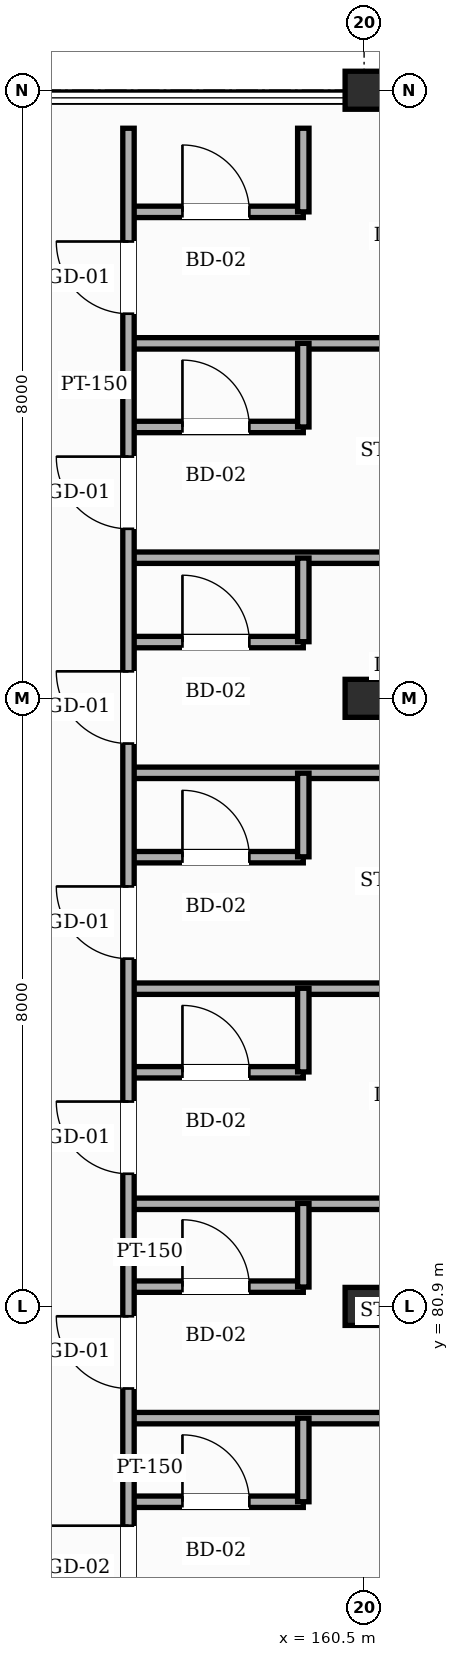
"""IFC4 building model, lengths in metres.
Left out: names, types, materials, properties, quantities, classifications, styles, units other than length and angle.
Written with IfcOpenShell. Run it as: python <this file> out.ifc"""

import sys

from ifc_helpers import new_model, si_unit, direction, frame, frame_2d, origin, origin_2d, place, context, subcontext, project, spatial, rectangle, hollow_rectangle, extrude, element, fill, save


model = new_model("IFC4")
c1 = context("Model", 3, precision=1e-05, world=origin(), true_north=direction((0.0, 1.0)))
c2 = subcontext(c1, "Body", "Model", "MODEL_VIEW")
j1 = project(units=[si_unit("LENGTHUNIT", "METRE"), si_unit("PLANEANGLEUNIT", "RADIAN")], contexts=[c1])
p1 = place(None, origin())
s1 = spatial("IfcSite", under=j1, at=p1, CompositionType="ELEMENT")
p2 = place(p1, origin())
s2 = spatial("IfcBuilding", under=s1, at=p2, CompositionType="ELEMENT")
p3 = place(p2, frame((0.0, 0.0, 35.4)))
s3 = spatial("IfcBuildingStorey", under=s2, at=p3, CompositionType="ELEMENT", Elevation=35.4)
for number, where, z_axis, x_axis in (
    (1, (160.5, 80.9, 0.0), (0.0, 0.0, 1.0), (1.0, 0.0, 0.0)),
    (2, (160.5, 88.9, 0.0), (0.0, 0.0, 1.0), (1.0, 0.0, 0.0)),
    (3, (160.5, 96.9, 0.0), (0.0, 0.0, 1.0), (1.0, 0.0, 0.0)),
):
    element("IfcColumn", number, at=place(p3, frame(where, z_axis=z_axis, x_axis=x_axis)), inside=s3, PredefinedType="COLUMN", context=c2, shape_type="SweptSolid", body=[
        extrude(hollow_rectangle(XDim=0.5, YDim=0.5, WallThickness=0.022, InnerFilletRadius=0.022, OuterFilletRadius=0.044, at=origin_2d()), origin(), (0.0, 0.0, 1.0), 3.6),
    ])
p4 = place(p3, frame((157.4, 78.33, 0.0), z_axis=(0.0, 0.0, 1.0), x_axis=(1.0, 0.0, 0.0)))
e4 = element("IfcWall", 4, at=p4, inside=s3, PredefinedType="PARTITIONING", context=c2, shape_type="SweptSolid", body=[
    extrude(rectangle(XDim=2.3, YDim=0.15, at=frame_2d((1.15, 0.0))), origin(), (0.0, 0.0, 1.0), 3.365),
])
p5 = place(p4, frame((0.71, 0.0, 0.0)))
e5 = element("IfcOpeningElement", 5, at=p5, cuts=e4, PredefinedType="OPENING", context=c2, shape_type="SweptSolid", body=[
    extrude(rectangle(XDim=0.88, YDim=2.12, at=frame_2d((0.44, 1.06))), frame((0.0, 0.085, 0.0), z_axis=(0.0, -1.0, 0.0), x_axis=(1.0, 0.0, 0.0)), (0.0, 0.0, 1.0), 0.17),
])
p6 = place(p3, frame((157.4, 79.43, 0.0), z_axis=(0.0, 0.0, 1.0), x_axis=(1.0, 0.0, 0.0)))
e6 = element("IfcWall", 6, at=p6, inside=s3, PredefinedType="PARTITIONING", context=c2, shape_type="SweptSolid", body=[
    extrude(rectangle(XDim=9.8, YDim=0.15, at=frame_2d((4.9, 0.0))), origin(), (0.0, 0.0, 1.0), 3.365),
])
p7 = place(p3, frame((157.4, 81.16, 0.0), z_axis=(0.0, 0.0, 1.0), x_axis=(1.0, 0.0, 0.0)))
e7 = element("IfcWall", 7, at=p7, inside=s3, PredefinedType="PARTITIONING", context=c2, shape_type="SweptSolid", body=[
    extrude(rectangle(XDim=2.3, YDim=0.15, at=frame_2d((1.15, 0.0))), origin(), (0.0, 0.0, 1.0), 2.755),
])
p8 = place(p7, frame((0.71, 0.0, 0.0)))
e8 = element("IfcOpeningElement", 8, at=p8, cuts=e7, PredefinedType="OPENING", context=c2, shape_type="SweptSolid", body=[
    extrude(rectangle(XDim=0.88, YDim=2.12, at=frame_2d((0.44, 1.06))), frame((0.0, 0.085, 0.0), z_axis=(0.0, -1.0, 0.0), x_axis=(1.0, 0.0, 0.0)), (0.0, 0.0, 1.0), 0.17),
])
p9 = place(p3, frame((157.4, 82.25, 0.0), z_axis=(0.0, 0.0, 1.0), x_axis=(1.0, 0.0, 0.0)))
e9 = element("IfcWall", 9, at=p9, inside=s3, PredefinedType="PARTITIONING", context=c2, shape_type="SweptSolid", body=[
    extrude(rectangle(XDim=9.8, YDim=0.15, at=frame_2d((4.9, 0.0))), origin(), (0.0, 0.0, 1.0), 3.365),
])
p10 = place(p3, frame((157.4, 83.98, 0.0), z_axis=(0.0, 0.0, 1.0), x_axis=(1.0, 0.0, 0.0)))
e10 = element("IfcWall", 10, at=p10, inside=s3, PredefinedType="PARTITIONING", context=c2, shape_type="SweptSolid", body=[
    extrude(rectangle(XDim=2.3, YDim=0.15, at=frame_2d((1.15, 0.0))), origin(), (0.0, 0.0, 1.0), 3.365),
])
p11 = place(p10, frame((0.71, 0.0, 0.0)))
e11 = element("IfcOpeningElement", 11, at=p11, cuts=e10, PredefinedType="OPENING", context=c2, shape_type="SweptSolid", body=[
    extrude(rectangle(XDim=0.88, YDim=2.12, at=frame_2d((0.44, 1.06))), frame((0.0, 0.085, 0.0), z_axis=(0.0, -1.0, 0.0), x_axis=(1.0, 0.0, 0.0)), (0.0, 0.0, 1.0), 0.17),
])
p12 = place(p3, frame((157.4, 85.08, 0.0), z_axis=(0.0, 0.0, 1.0), x_axis=(1.0, 0.0, 0.0)))
e12 = element("IfcWall", 12, at=p12, inside=s3, PredefinedType="PARTITIONING", context=c2, shape_type="SweptSolid", body=[
    extrude(rectangle(XDim=9.8, YDim=0.15, at=frame_2d((4.9, 0.0))), origin(), (0.0, 0.0, 1.0), 3.005),
])
p13 = place(p3, frame((157.4, 86.81, 0.0), z_axis=(0.0, 0.0, 1.0), x_axis=(1.0, 0.0, 0.0)))
e13 = element("IfcWall", 13, at=p13, inside=s3, PredefinedType="PARTITIONING", context=c2, shape_type="SweptSolid", body=[
    extrude(rectangle(XDim=2.3, YDim=0.15, at=frame_2d((1.15, 0.0))), origin(), (0.0, 0.0, 1.0), 3.365),
])
p14 = place(p13, frame((0.71, 0.0, 0.0)))
e14 = element("IfcOpeningElement", 14, at=p14, cuts=e13, PredefinedType="OPENING", context=c2, shape_type="SweptSolid", body=[
    extrude(rectangle(XDim=0.88, YDim=2.12, at=frame_2d((0.44, 1.06))), frame((0.0, 0.085, 0.0), z_axis=(0.0, -1.0, 0.0), x_axis=(1.0, 0.0, 0.0)), (0.0, 0.0, 1.0), 0.17),
])
p15 = place(p3, frame((157.4, 87.92, 0.0), z_axis=(0.0, 0.0, 1.0), x_axis=(1.0, 0.0, 0.0)))
e15 = element("IfcWall", 15, at=p15, inside=s3, PredefinedType="PARTITIONING", context=c2, shape_type="SweptSolid", body=[
    extrude(rectangle(XDim=9.8, YDim=0.15, at=frame_2d((4.9, 0.0))), origin(), (0.0, 0.0, 1.0), 3.365),
])
p16 = place(p3, frame((157.4, 89.64, 0.0), z_axis=(0.0, 0.0, 1.0), x_axis=(1.0, 0.0, 0.0)))
e16 = element("IfcWall", 16, at=p16, inside=s3, PredefinedType="PARTITIONING", context=c2, shape_type="SweptSolid", body=[
    extrude(rectangle(XDim=2.3, YDim=0.15, at=frame_2d((1.15, 0.0))), origin(), (0.0, 0.0, 1.0), 3.365),
])
p17 = place(p16, frame((0.71, 0.0, 0.0)))
e17 = element("IfcOpeningElement", 17, at=p17, cuts=e16, PredefinedType="OPENING", context=c2, shape_type="SweptSolid", body=[
    extrude(rectangle(XDim=0.88, YDim=2.12, at=frame_2d((0.44, 1.06))), frame((0.0, 0.085, 0.0), z_axis=(0.0, -1.0, 0.0), x_axis=(1.0, 0.0, 0.0)), (0.0, 0.0, 1.0), 0.17),
])
p18 = place(p3, frame((157.4, 90.75, 0.0), z_axis=(0.0, 0.0, 1.0), x_axis=(1.0, 0.0, 0.0)))
e18 = element("IfcWall", 18, at=p18, inside=s3, PredefinedType="PARTITIONING", context=c2, shape_type="SweptSolid", body=[
    extrude(rectangle(XDim=9.8, YDim=0.15, at=frame_2d((4.9, 0.0))), origin(), (0.0, 0.0, 1.0), 3.365),
])
p19 = place(p3, frame((157.4, 92.47, 0.0), z_axis=(0.0, 0.0, 1.0), x_axis=(1.0, 0.0, 0.0)))
e19 = element("IfcWall", 19, at=p19, inside=s3, PredefinedType="PARTITIONING", context=c2, shape_type="SweptSolid", body=[
    extrude(rectangle(XDim=2.3, YDim=0.15, at=frame_2d((1.15, 0.0))), origin(), (0.0, 0.0, 1.0), 3.365),
])
p20 = place(p19, frame((0.71, 0.0, 0.0)))
e20 = element("IfcOpeningElement", 20, at=p20, cuts=e19, PredefinedType="OPENING", context=c2, shape_type="SweptSolid", body=[
    extrude(rectangle(XDim=0.88, YDim=2.12, at=frame_2d((0.44, 1.06))), frame((0.0, 0.085, 0.0), z_axis=(0.0, -1.0, 0.0), x_axis=(1.0, 0.0, 0.0)), (0.0, 0.0, 1.0), 0.17),
])
p21 = place(p3, frame((157.4, 93.57, 0.0), z_axis=(0.0, 0.0, 1.0), x_axis=(1.0, 0.0, 0.0)))
e21 = element("IfcWall", 21, at=p21, inside=s3, PredefinedType="PARTITIONING", context=c2, shape_type="SweptSolid", body=[
    extrude(rectangle(XDim=9.8, YDim=0.15, at=frame_2d((4.9, 0.0))), origin(), (0.0, 0.0, 1.0), 3.365),
])
p22 = place(p3, frame((157.4, 95.3, 0.0), z_axis=(0.0, 0.0, 1.0), x_axis=(1.0, 0.0, 0.0)))
e22 = element("IfcWall", 22, at=p22, inside=s3, PredefinedType="PARTITIONING", context=c2, shape_type="SweptSolid", body=[
    extrude(rectangle(XDim=2.3, YDim=0.15, at=frame_2d((1.15, 0.0))), origin(), (0.0, 0.0, 1.0), 3.365),
])
p23 = place(p22, frame((0.71, 0.0, 0.0)))
e23 = element("IfcOpeningElement", 23, at=p23, cuts=e22, PredefinedType="OPENING", context=c2, shape_type="SweptSolid", body=[
    extrude(rectangle(XDim=0.88, YDim=2.12, at=frame_2d((0.44, 1.06))), frame((0.0, 0.085, 0.0), z_axis=(0.0, -1.0, 0.0), x_axis=(1.0, 0.0, 0.0)), (0.0, 0.0, 1.0), 0.17),
])
p24 = place(p3, frame((157.4, 76.6, 0.0), z_axis=(0.0, 0.0, 1.0), x_axis=(0.0, 1.0, 0.0)))
e24 = element("IfcWall", 24, at=p24, inside=s3, PredefinedType="PARTITIONING", context=c2, shape_type="SweptSolid", body=[
    extrude(rectangle(XDim=19.8, YDim=0.15, at=frame_2d((9.9, 0.0))), origin(), (0.0, 0.0, 1.0), 3.365),
])
p25 = place(p24, frame((0.315, 0.0, 0.0)))
e25 = element("IfcOpeningElement", 25, at=p25, cuts=e24, PredefinedType="OPENING", context=c2, shape_type="SweptSolid", body=[
    extrude(rectangle(XDim=1.1, YDim=2.2, at=frame_2d((0.55, 1.1))), frame((0.0, 0.085, 0.0), z_axis=(0.0, -1.0, 0.0), x_axis=(1.0, 0.0, 0.0)), (0.0, 0.0, 1.0), 0.17),
])
p26 = place(p24, frame((3.22, 0.0, 0.0)))
e26 = element("IfcOpeningElement", 26, at=p26, cuts=e24, PredefinedType="OPENING", context=c2, shape_type="SweptSolid", body=[
    extrude(rectangle(XDim=0.95, YDim=2.15, at=frame_2d((0.475, 1.075))), frame((0.0, 0.085, 0.0), z_axis=(0.0, -1.0, 0.0), x_axis=(1.0, 0.0, 0.0)), (0.0, 0.0, 1.0), 0.17),
])
p27 = place(p24, frame((6.045, 0.0, 0.0)))
e27 = element("IfcOpeningElement", 27, at=p27, cuts=e24, PredefinedType="OPENING", context=c2, shape_type="SweptSolid", body=[
    extrude(rectangle(XDim=0.95, YDim=2.15, at=frame_2d((0.475, 1.075))), frame((0.0, 0.085, 0.0), z_axis=(0.0, -1.0, 0.0), x_axis=(1.0, 0.0, 0.0)), (0.0, 0.0, 1.0), 0.17),
])
p28 = place(p24, frame((8.875, 0.0, 0.0)))
e28 = element("IfcOpeningElement", 28, at=p28, cuts=e24, PredefinedType="OPENING", context=c2, shape_type="SweptSolid", body=[
    extrude(rectangle(XDim=0.95, YDim=2.15, at=frame_2d((0.475, 1.075))), frame((0.0, 0.085, 0.0), z_axis=(0.0, -1.0, 0.0), x_axis=(1.0, 0.0, 0.0)), (0.0, 0.0, 1.0), 0.17),
])
p29 = place(p24, frame((11.705, 0.0, 0.0)))
e29 = element("IfcOpeningElement", 29, at=p29, cuts=e24, PredefinedType="OPENING", context=c2, shape_type="SweptSolid", body=[
    extrude(rectangle(XDim=0.95, YDim=2.15, at=frame_2d((0.475, 1.075))), frame((0.0, 0.085, 0.0), z_axis=(0.0, -1.0, 0.0), x_axis=(1.0, 0.0, 0.0)), (0.0, 0.0, 1.0), 0.17),
])
p30 = place(p24, frame((14.53, 0.0, 0.0)))
e30 = element("IfcOpeningElement", 30, at=p30, cuts=e24, PredefinedType="OPENING", context=c2, shape_type="SweptSolid", body=[
    extrude(rectangle(XDim=0.95, YDim=2.15, at=frame_2d((0.475, 1.075))), frame((0.0, 0.085, 0.0), z_axis=(0.0, -1.0, 0.0), x_axis=(1.0, 0.0, 0.0)), (0.0, 0.0, 1.0), 0.17),
])
p31 = place(p24, frame((17.36, 0.0, 0.0)))
e31 = element("IfcOpeningElement", 31, at=p31, cuts=e24, PredefinedType="OPENING", context=c2, shape_type="SweptSolid", body=[
    extrude(rectangle(XDim=0.95, YDim=2.15, at=frame_2d((0.475, 1.075))), frame((0.0, 0.085, 0.0), z_axis=(0.0, -1.0, 0.0), x_axis=(1.0, 0.0, 0.0)), (0.0, 0.0, 1.0), 0.17),
])
for number, where, z_axis, x_axis in (
    (32, (159.7, 78.33, 0.0), (0.0, 0.0, 1.0), (0.0, 1.0, 0.0)),
    (33, (159.7, 81.155, 0.0), (0.0, 0.0, 1.0), (0.0, 1.0, 0.0)),
    (34, (159.7, 83.985, 0.0), (0.0, 0.0, 1.0), (0.0, 1.0, 0.0)),
):
    element("IfcWall", number, at=place(p3, frame(where, z_axis=z_axis, x_axis=x_axis)), inside=s3, PredefinedType="PARTITIONING", context=c2, shape_type="SweptSolid", body=[
        extrude(rectangle(XDim=1.1, YDim=0.15, at=frame_2d((0.55, 0.0))), origin(), (0.0, 0.0, 1.0), 3.365),
    ])
for number, where, z_axis, x_axis in (
    (35, (159.7, 86.815, 0.0), (0.0, 0.0, 1.0), (0.0, 1.0, 0.0)),
    (36, (159.7, 89.645, 0.0), (0.0, 0.0, 1.0), (0.0, 1.0, 0.0)),
    (37, (159.7, 92.47, 0.0), (0.0, 0.0, 1.0), (0.0, 1.0, 0.0)),
):
    element("IfcWall", number, at=place(p3, frame(where, z_axis=z_axis, x_axis=x_axis)), inside=s3, PredefinedType="PARTITIONING", context=c2, shape_type="SweptSolid", body=[
        extrude(rectangle(XDim=1.1, YDim=0.15, at=frame_2d((0.55, 0.0))), origin(), (0.0, 0.0, 1.0), 3.365),
    ])
p32 = place(p3, frame((159.7, 95.3, 0.0), z_axis=(0.0, 0.0, 1.0), x_axis=(0.0, 1.0, 0.0)))
e38 = element("IfcWall", 38, at=p32, inside=s3, PredefinedType="PARTITIONING", context=c2, shape_type="SweptSolid", body=[
    extrude(rectangle(XDim=1.1, YDim=0.15, at=frame_2d((0.55, 0.0))), origin(), (0.0, 0.0, 1.0), 3.365),
])
p33 = place(p25, origin())
e39 = element("IfcDoor", 39, at=p33, inside=s3, OperationType="SINGLE_SWING_RIGHT", PredefinedType="DOOR", context=c2, shape_type="SweptSolid", body=[
    extrude(rectangle(XDim=1.1, YDim=2.2, at=frame_2d((0.55, 1.1))), frame((0.0, 0.025, 0.0), z_axis=(0.0, -1.0, 0.0), x_axis=(1.0, 0.0, 0.0)), (0.0, 0.0, 1.0), 0.05),
])
fill(e25, e39)
p34 = place(p5, origin())
e40 = element("IfcDoor", 40, at=p34, inside=s3, OperationType="SINGLE_SWING_LEFT", PredefinedType="DOOR", context=c2, shape_type="SweptSolid", body=[
    extrude(rectangle(XDim=0.88, YDim=2.12, at=frame_2d((0.44, 1.06))), frame((0.0, 0.025, 0.0), z_axis=(0.0, -1.0, 0.0), x_axis=(1.0, 0.0, 0.0)), (0.0, 0.0, 1.0), 0.05),
])
fill(e5, e40)
p35 = place(p26, origin())
e41 = element("IfcDoor", 41, at=p35, inside=s3, OperationType="SINGLE_SWING_RIGHT", PredefinedType="DOOR", context=c2, shape_type="SweptSolid", body=[
    extrude(rectangle(XDim=0.95, YDim=2.15, at=frame_2d((0.475, 1.075))), frame((0.0, 0.025, 0.0), z_axis=(0.0, -1.0, 0.0), x_axis=(1.0, 0.0, 0.0)), (0.0, 0.0, 1.0), 0.05),
])
fill(e26, e41)
p36 = place(p8, origin())
e42 = element("IfcDoor", 42, at=p36, inside=s3, OperationType="SINGLE_SWING_LEFT", PredefinedType="DOOR", context=c2, shape_type="SweptSolid", body=[
    extrude(rectangle(XDim=0.88, YDim=2.12, at=frame_2d((0.44, 1.06))), frame((0.0, 0.025, 0.0), z_axis=(0.0, -1.0, 0.0), x_axis=(1.0, 0.0, 0.0)), (0.0, 0.0, 1.0), 0.05),
])
fill(e8, e42)
p37 = place(p27, origin())
e43 = element("IfcDoor", 43, at=p37, inside=s3, OperationType="SINGLE_SWING_RIGHT", PredefinedType="DOOR", context=c2, shape_type="SweptSolid", body=[
    extrude(rectangle(XDim=0.95, YDim=2.15, at=frame_2d((0.475, 1.075))), frame((0.0, 0.025, 0.0), z_axis=(0.0, -1.0, 0.0), x_axis=(1.0, 0.0, 0.0)), (0.0, 0.0, 1.0), 0.05),
])
fill(e27, e43)
p38 = place(p11, origin())
e44 = element("IfcDoor", 44, at=p38, inside=s3, OperationType="SINGLE_SWING_LEFT", PredefinedType="DOOR", context=c2, shape_type="SweptSolid", body=[
    extrude(rectangle(XDim=0.88, YDim=2.12, at=frame_2d((0.44, 1.06))), frame((0.0, 0.025, 0.0), z_axis=(0.0, -1.0, 0.0), x_axis=(1.0, 0.0, 0.0)), (0.0, 0.0, 1.0), 0.05),
])
fill(e11, e44)
p39 = place(p28, origin())
e45 = element("IfcDoor", 45, at=p39, inside=s3, OperationType="SINGLE_SWING_RIGHT", PredefinedType="DOOR", context=c2, shape_type="SweptSolid", body=[
    extrude(rectangle(XDim=0.95, YDim=2.15, at=frame_2d((0.475, 1.075))), frame((0.0, 0.025, 0.0), z_axis=(0.0, -1.0, 0.0), x_axis=(1.0, 0.0, 0.0)), (0.0, 0.0, 1.0), 0.05),
])
fill(e28, e45)
p40 = place(p14, origin())
e46 = element("IfcDoor", 46, at=p40, inside=s3, OperationType="SINGLE_SWING_LEFT", PredefinedType="DOOR", context=c2, shape_type="SweptSolid", body=[
    extrude(rectangle(XDim=0.88, YDim=2.12, at=frame_2d((0.44, 1.06))), frame((0.0, 0.025, 0.0), z_axis=(0.0, -1.0, 0.0), x_axis=(1.0, 0.0, 0.0)), (0.0, 0.0, 1.0), 0.05),
])
fill(e14, e46)
p41 = place(p29, origin())
e47 = element("IfcDoor", 47, at=p41, inside=s3, OperationType="SINGLE_SWING_RIGHT", PredefinedType="DOOR", context=c2, shape_type="SweptSolid", body=[
    extrude(rectangle(XDim=0.95, YDim=2.15, at=frame_2d((0.475, 1.075))), frame((0.0, 0.025, 0.0), z_axis=(0.0, -1.0, 0.0), x_axis=(1.0, 0.0, 0.0)), (0.0, 0.0, 1.0), 0.05),
])
fill(e29, e47)
p42 = place(p17, origin())
e48 = element("IfcDoor", 48, at=p42, inside=s3, OperationType="SINGLE_SWING_LEFT", PredefinedType="DOOR", context=c2, shape_type="SweptSolid", body=[
    extrude(rectangle(XDim=0.88, YDim=2.12, at=frame_2d((0.44, 1.06))), frame((0.0, 0.025, 0.0), z_axis=(0.0, -1.0, 0.0), x_axis=(1.0, 0.0, 0.0)), (0.0, 0.0, 1.0), 0.05),
])
fill(e17, e48)
p43 = place(p30, origin())
e49 = element("IfcDoor", 49, at=p43, inside=s3, OperationType="SINGLE_SWING_RIGHT", PredefinedType="DOOR", context=c2, shape_type="SweptSolid", body=[
    extrude(rectangle(XDim=0.95, YDim=2.15, at=frame_2d((0.475, 1.075))), frame((0.0, 0.025, 0.0), z_axis=(0.0, -1.0, 0.0), x_axis=(1.0, 0.0, 0.0)), (0.0, 0.0, 1.0), 0.05),
])
fill(e30, e49)
p44 = place(p20, origin())
e50 = element("IfcDoor", 50, at=p44, inside=s3, OperationType="SINGLE_SWING_LEFT", PredefinedType="DOOR", context=c2, shape_type="SweptSolid", body=[
    extrude(rectangle(XDim=0.88, YDim=2.12, at=frame_2d((0.44, 1.06))), frame((0.0, 0.025, 0.0), z_axis=(0.0, -1.0, 0.0), x_axis=(1.0, 0.0, 0.0)), (0.0, 0.0, 1.0), 0.05),
])
fill(e20, e50)
p45 = place(p31, origin())
e51 = element("IfcDoor", 51, at=p45, inside=s3, OperationType="SINGLE_SWING_RIGHT", PredefinedType="DOOR", context=c2, shape_type="SweptSolid", body=[
    extrude(rectangle(XDim=0.95, YDim=2.15, at=frame_2d((0.475, 1.075))), frame((0.0, 0.025, 0.0), z_axis=(0.0, -1.0, 0.0), x_axis=(1.0, 0.0, 0.0)), (0.0, 0.0, 1.0), 0.05),
])
fill(e31, e51)
p46 = place(p23, origin())
e52 = element("IfcDoor", 52, at=p46, inside=s3, OperationType="SINGLE_SWING_LEFT", PredefinedType="DOOR", context=c2, shape_type="SweptSolid", body=[
    extrude(rectangle(XDim=0.88, YDim=2.12, at=frame_2d((0.44, 1.06))), frame((0.0, 0.025, 0.0), z_axis=(0.0, -1.0, 0.0), x_axis=(1.0, 0.0, 0.0)), (0.0, 0.0, 1.0), 0.05),
])
fill(e23, e52)
save(model, sys.argv[1])
